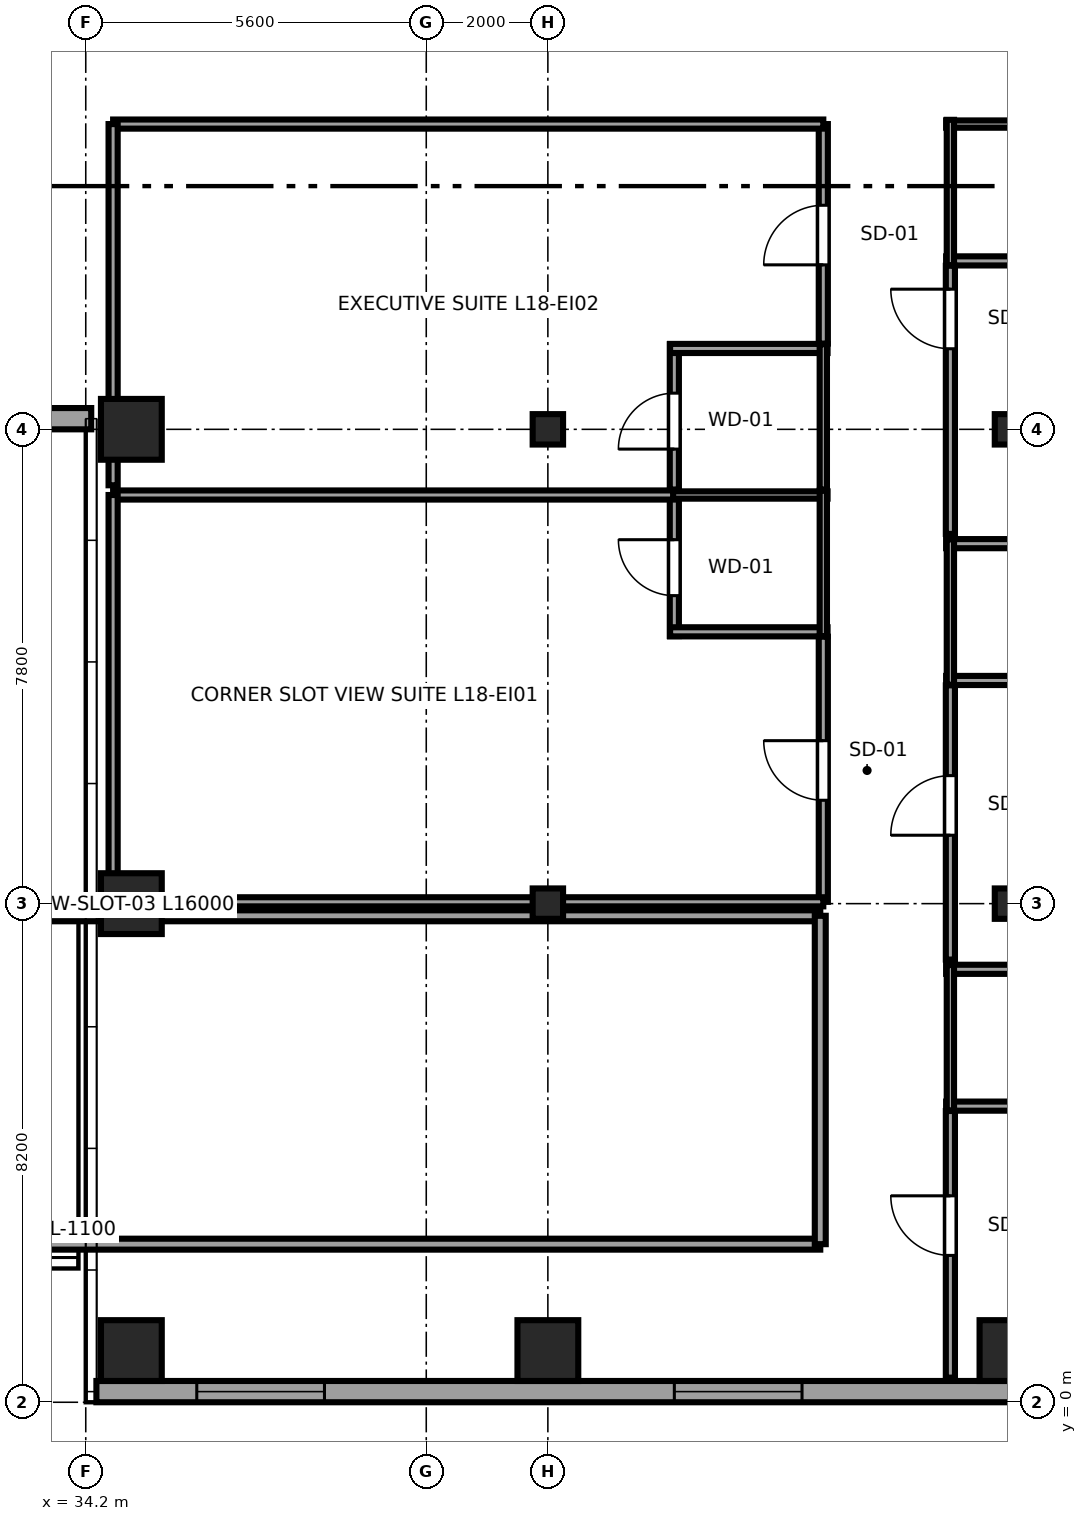
"""IFC4 building model, lengths in metres.
Left out: names, types, materials, properties, quantities, classifications, styles, units other than length and angle.
Written with IfcOpenShell. Run it as: python <this file> out.ifc"""

import sys

from ifc_helpers import new_model, si_unit, direction, frame, frame_2d, origin, origin_2d, place, context, subcontext, project, spatial, rectangle, i_section, extrude, source, transform, mapped, element, fill, save


model = new_model("IFC4")
c1 = context("Model", 3, precision=1e-05, world=origin(), true_north=direction((0.0, 1.0)))
c2 = subcontext(c1, "Body", "Model", "MODEL_VIEW")
j1 = project(units=[si_unit("LENGTHUNIT", "METRE"), si_unit("PLANEANGLEUNIT", "RADIAN")], contexts=[c1])
p1 = place(None, origin())
s1 = spatial("IfcSite", under=j1, at=p1, CompositionType="ELEMENT")
p2 = place(p1, origin())
s2 = spatial("IfcBuilding", under=s1, at=p2, CompositionType="ELEMENT")
p3 = place(p2, frame((0.0, 0.0, 74.6)))
s3 = spatial("IfcBuildingStorey", under=s2, at=p3, CompositionType="ELEMENT", Elevation=74.6)
m1 = source(origin(), c2, "Body", "SweptSolid", [
    extrude(rectangle(XDim=1.0, YDim=1.0, at=origin_2d()), origin(), (0.0, 0.0, 1.0), 3.55),
])
for number, where, z_axis, x_axis in (
    (1, (34.95, 0.85, 0.0), (0.0, 0.0, 1.0), (1.0, 0.0, 0.0)),
    (2, (34.95, 8.2, 0.0), (0.0, 0.0, 1.0), (1.0, 0.0, 0.0)),
    (3, (34.95, 16.0, 0.0), (0.0, 0.0, 1.0), (1.0, 0.0, 0.0)),
    (4, (41.8, 0.85, 0.0), (0.0, 0.0, 1.0), (1.0, 0.0, 0.0)),
):
    element("IfcColumn", number, at=place(p3, frame(where, z_axis=z_axis, x_axis=x_axis)), inside=s3, PredefinedType="COLUMN", context=c2, shape_type="MappedRepresentation", body=[
        mapped(m1, transform((0.0, 0.0, 0.0), x_axis=(1.0, 0.0, 0.0), y_axis=(0.0, 1.0, 0.0), z_axis=(0.0, 0.0, 1.0), scale=1.0)),
    ])
m2 = source(origin(), c2, "Body", "SweptSolid", [
    extrude(i_section(OverallWidth=0.5, OverallDepth=0.5, WebThickness=0.028, FlangeThickness=0.045, at=origin_2d()), origin(), (0.0, 0.0, 1.0), 3.55),
])
for number, where, z_axis, x_axis in (
    (5, (41.8, 8.2, 0.0), (0.0, 0.0, 1.0), (1.0, 0.0, 0.0)),
    (6, (41.8, 16.0, 0.0), (0.0, 0.0, 1.0), (1.0, 0.0, 0.0)),
):
    element("IfcColumn", number, at=place(p3, frame(where, z_axis=z_axis, x_axis=x_axis)), inside=s3, PredefinedType="COLUMN", context=c2, shape_type="MappedRepresentation", body=[
        mapped(m2, transform((0.0, 0.0, 0.0), x_axis=(1.0, 0.0, 0.0), y_axis=(0.0, 1.0, 0.0), z_axis=(0.0, 0.0, 1.0), scale=1.0)),
    ])
p4 = place(p3, frame((49.4, 0.85, 0.0), z_axis=(0.0, 0.0, 1.0), x_axis=(1.0, 0.0, 0.0)))
e7 = element("IfcColumn", 7, at=p4, inside=s3, PredefinedType="COLUMN", context=c2, shape_type="MappedRepresentation", body=[
    mapped(m1, transform((0.0, 0.0, 0.0), x_axis=(1.0, 0.0, 0.0), y_axis=(0.0, 1.0, 0.0), z_axis=(0.0, 0.0, 1.0), scale=1.0)),
])
for number, where, z_axis, x_axis in (
    (8, (49.4, 8.2, 0.0), (0.0, 0.0, 1.0), (1.0, 0.0, 0.0)),
    (9, (49.4, 16.0, 0.0), (0.0, 0.0, 1.0), (1.0, 0.0, 0.0)),
):
    element("IfcColumn", number, at=place(p3, frame(where, z_axis=z_axis, x_axis=x_axis)), inside=s3, PredefinedType="COLUMN", context=c2, shape_type="MappedRepresentation", body=[
        mapped(m2, transform((0.0, 0.0, 0.0), x_axis=(1.0, 0.0, 0.0), y_axis=(0.0, 1.0, 0.0), z_axis=(0.0, 0.0, 1.0), scale=1.0)),
    ])
p5 = place(p3, frame((22.71, 16.175, 0.0), z_axis=(0.0, 0.0, 1.0), x_axis=(1.0, 0.0, 0.0)))
e10 = element("IfcWall", 10, at=p5, inside=s3, PredefinedType="SOLIDWALL", context=c2, shape_type="SweptSolid", body=[
    extrude(rectangle(XDim=11.58, YDim=0.35, at=frame_2d((5.79, 0.0))), origin(), (0.0, 0.0, 1.0), 2.748),
])
p6 = place(p5, frame((2.145, 0.0, 0.68)))
e11 = element("IfcOpeningElement", 11, at=p6, cuts=e10, PredefinedType="OPENING", context=c2, shape_type="SweptSolid", body=[
    extrude(rectangle(XDim=2.1, YDim=1.9, at=frame_2d((1.05, 0.95))), frame((0.0, 0.185, 0.0), z_axis=(0.0, -1.0, 0.0), x_axis=(1.0, 0.0, 0.0)), (0.0, 0.0, 1.0), 0.37),
])
p7 = place(p5, frame((7.335, 0.0, 0.68)))
e12 = element("IfcOpeningElement", 12, at=p7, cuts=e10, PredefinedType="OPENING", context=c2, shape_type="SweptSolid", body=[
    extrude(rectangle(XDim=2.1, YDim=1.9, at=frame_2d((1.05, 0.95))), frame((0.0, 0.185, 0.0), z_axis=(0.0, -1.0, 0.0), x_axis=(1.0, 0.0, 0.0)), (0.0, 0.0, 1.0), 0.37),
])
p8 = place(p3, frame((34.375, 0.175, 0.0), z_axis=(0.0, 0.0, 1.0), x_axis=(1.0, 0.0, 0.0)))
e13 = element("IfcWall", 13, at=p8, inside=s3, PredefinedType="SOLIDWALL", context=c2, shape_type="SweptSolid", body=[
    extrude(rectangle(XDim=18.008, YDim=0.35, at=frame_2d((9.004, 0.0))), origin(), (0.0, 0.0, 1.0), 3.37),
])
p9 = place(p8, frame((1.651, 0.0, 0.68)))
e14 = element("IfcOpeningElement", 14, at=p9, cuts=e13, PredefinedType="OPENING", context=c2, shape_type="SweptSolid", body=[
    extrude(rectangle(XDim=2.1, YDim=1.9, at=frame_2d((1.05, 0.95))), frame((0.0, 0.185, 0.0), z_axis=(0.0, -1.0, 0.0), x_axis=(1.0, 0.0, 0.0)), (0.0, 0.0, 1.0), 0.37),
])
p10 = place(p8, frame((9.505, 0.0, 0.68)))
e15 = element("IfcOpeningElement", 15, at=p10, cuts=e13, PredefinedType="OPENING", context=c2, shape_type="SweptSolid", body=[
    extrude(rectangle(XDim=2.1, YDim=1.9, at=frame_2d((1.05, 0.95))), frame((0.0, 0.185, 0.0), z_axis=(0.0, -1.0, 0.0), x_axis=(1.0, 0.0, 0.0)), (0.0, 0.0, 1.0), 0.37),
])
p11 = place(p3, frame((43.88, 12.6, 0.0), z_axis=(0.0, 0.0, 1.0), x_axis=(0.0, 1.0, 0.0)))
e16 = element("IfcWall", 16, at=p11, inside=s3, PredefinedType="PARTITIONING", context=c2, shape_type="SweptSolid", body=[
    extrude(rectangle(XDim=2.39, YDim=0.15, at=frame_2d((1.195, 0.0))), origin(), (0.0, 0.0, 1.0), 3.37),
])
p12 = place(p11, frame((0.665, 0.0, 0.0)))
e17 = element("IfcOpeningElement", 17, at=p12, cuts=e16, PredefinedType="OPENING", context=c2, shape_type="SweptSolid", body=[
    extrude(rectangle(XDim=0.92, YDim=2.01, at=frame_2d((0.46, 1.005))), frame((0.0, 0.085, 0.0), z_axis=(0.0, -1.0, 0.0), x_axis=(1.0, 0.0, 0.0)), (0.0, 0.0, 1.0), 0.17),
])
p13 = place(p3, frame((43.81, 12.67, 0.0), z_axis=(0.0, 0.0, 1.0), x_axis=(1.0, 0.0, 0.0)))
e18 = element("IfcWall", 18, at=p13, inside=s3, PredefinedType="PARTITIONING", context=c2, shape_type="SweptSolid", body=[
    extrude(rectangle(XDim=2.59, YDim=0.15, at=frame_2d((1.295, 0.0))), origin(), (0.0, 0.0, 1.0), 3.37),
])
p14 = place(p3, frame((43.81, 14.92, 0.0), z_axis=(0.0, 0.0, 1.0), x_axis=(1.0, 0.0, 0.0)))
e19 = element("IfcWall", 19, at=p14, inside=s3, PredefinedType="PLUMBINGWALL", context=c2, shape_type="SweptSolid", body=[
    extrude(rectangle(XDim=2.59, YDim=0.12, at=frame_2d((1.295, 0.0))), origin(), (0.0, 0.0, 1.0), 3.37),
])
p15 = place(p3, frame((46.33, 12.6, 0.0), z_axis=(0.0, 0.0, 1.0), x_axis=(0.0, 1.0, 0.0)))
e20 = element("IfcWall", 20, at=p15, inside=s3, PredefinedType="PLUMBINGWALL", context=c2, shape_type="SweptSolid", body=[
    extrude(rectangle(XDim=2.39, YDim=0.12, at=frame_2d((1.195, 0.0))), origin(), (0.0, 0.0, 1.0), 3.37),
])
p16 = place(p3, frame((43.88, 15.01, 0.0), z_axis=(0.0, 0.0, 1.0), x_axis=(0.0, 1.0, 0.0)))
e21 = element("IfcWall", 21, at=p16, inside=s3, PredefinedType="PARTITIONING", context=c2, shape_type="SweptSolid", body=[
    extrude(rectangle(XDim=2.39, YDim=0.15, at=frame_2d((1.195, 0.0))), origin(), (0.0, 0.0, 1.0), 3.37),
])
p17 = place(p16, frame((0.665, 0.0, 0.0)))
e22 = element("IfcOpeningElement", 22, at=p17, cuts=e21, PredefinedType="OPENING", context=c2, shape_type="SweptSolid", body=[
    extrude(rectangle(XDim=0.92, YDim=2.01, at=frame_2d((0.46, 1.005))), frame((0.0, 0.085, 0.0), z_axis=(0.0, -1.0, 0.0), x_axis=(1.0, 0.0, 0.0)), (0.0, 0.0, 1.0), 0.17),
])
p18 = place(p3, frame((43.81, 17.33, 0.0), z_axis=(0.0, 0.0, 1.0), x_axis=(1.0, 0.0, 0.0)))
e23 = element("IfcWall", 23, at=p18, inside=s3, PredefinedType="PARTITIONING", context=c2, shape_type="SweptSolid", body=[
    extrude(rectangle(XDim=2.59, YDim=0.15, at=frame_2d((1.295, 0.0))), origin(), (0.0, 0.0, 1.0), 3.37),
])
p19 = place(p3, frame((46.33, 15.01, 0.0), z_axis=(0.0, 0.0, 1.0), x_axis=(0.0, 1.0, 0.0)))
e24 = element("IfcWall", 24, at=p19, inside=s3, PredefinedType="PLUMBINGWALL", context=c2, shape_type="SweptSolid", body=[
    extrude(rectangle(XDim=2.39, YDim=0.12, at=frame_2d((1.195, 0.0))), origin(), (0.0, 0.0, 1.0), 3.37),
])
for number, where, z_axis, x_axis in (
    (25, (48.35, 4.87, 0.0), (0.0, 0.0, 1.0), (1.0, 0.0, 0.0)),
    (26, (48.35, 7.12, 0.0), (0.0, 0.0, 1.0), (1.0, 0.0, 0.0)),
):
    element("IfcWall", number, at=place(p3, frame(where, z_axis=z_axis, x_axis=x_axis)), inside=s3, PredefinedType="PARTITIONING", context=c2, shape_type="SweptSolid", body=[
        extrude(rectangle(XDim=2.59, YDim=0.15, at=frame_2d((1.295, 0.0))), origin(), (0.0, 0.0, 1.0), 3.37),
    ])
p20 = place(p3, frame((48.42, 4.8, 0.0), z_axis=(0.0, 0.0, 1.0), x_axis=(0.0, 1.0, 0.0)))
e27 = element("IfcWall", 27, at=p20, inside=s3, PredefinedType="PLUMBINGWALL", context=c2, shape_type="SweptSolid", body=[
    extrude(rectangle(XDim=2.39, YDim=0.12, at=frame_2d((1.195, 0.0))), origin(), (0.0, 0.0, 1.0), 3.37),
])
for number, where, z_axis, x_axis in (
    (28, (48.35, 11.87, 0.0), (0.0, 0.0, 1.0), (1.0, 0.0, 0.0)),
    (29, (48.35, 14.12, 0.0), (0.0, 0.0, 1.0), (1.0, 0.0, 0.0)),
):
    element("IfcWall", number, at=place(p3, frame(where, z_axis=z_axis, x_axis=x_axis)), inside=s3, PredefinedType="PARTITIONING", context=c2, shape_type="SweptSolid", body=[
        extrude(rectangle(XDim=2.59, YDim=0.15, at=frame_2d((1.295, 0.0))), origin(), (0.0, 0.0, 1.0), 3.37),
    ])
p21 = place(p3, frame((48.42, 11.8, 0.0), z_axis=(0.0, 0.0, 1.0), x_axis=(0.0, 1.0, 0.0)))
e30 = element("IfcWall", 30, at=p21, inside=s3, PredefinedType="PLUMBINGWALL", context=c2, shape_type="SweptSolid", body=[
    extrude(rectangle(XDim=2.39, YDim=0.12, at=frame_2d((1.195, 0.0))), origin(), (0.0, 0.0, 1.0), 3.37),
])
p22 = place(p3, frame((48.35, 18.77, 0.0), z_axis=(0.0, 0.0, 1.0), x_axis=(1.0, 0.0, 0.0)))
e31 = element("IfcWall", 31, at=p22, inside=s3, PredefinedType="PARTITIONING", context=c2, shape_type="SweptSolid", body=[
    extrude(rectangle(XDim=2.59, YDim=0.15, at=frame_2d((1.295, 0.0))), origin(), (0.0, 0.0, 1.0), 3.37),
])
p23 = place(p3, frame((48.35, 21.02, 0.0), z_axis=(0.0, 0.0, 1.0), x_axis=(1.0, 0.0, 0.0)))
e32 = element("IfcWall", 32, at=p23, inside=s3, PredefinedType="PLUMBINGWALL", context=c2, shape_type="SweptSolid", body=[
    extrude(rectangle(XDim=2.59, YDim=0.12, at=frame_2d((1.295, 0.0))), origin(), (0.0, 0.0, 1.0), 3.37),
])
p24 = place(p3, frame((48.42, 18.7, 0.0), z_axis=(0.0, 0.0, 1.0), x_axis=(0.0, 1.0, 0.0)))
e33 = element("IfcWall", 33, at=p24, inside=s3, PredefinedType="PLUMBINGWALL", context=c2, shape_type="SweptSolid", body=[
    extrude(rectangle(XDim=2.39, YDim=0.12, at=frame_2d((1.195, 0.0))), origin(), (0.0, 0.0, 1.0), 3.37),
])
p25 = place(p3, frame((46.33, 8.23, 0.0), z_axis=(0.0, 0.0, 1.0), x_axis=(0.0, 1.0, 0.0)))
e34 = element("IfcWall", 34, at=p25, inside=s3, PredefinedType="PARTITIONING", context=c2, shape_type="SweptSolid", body=[
    extrude(rectangle(XDim=4.36, YDim=0.15, at=frame_2d((2.18, 0.0))), origin(), (0.0, 0.0, 1.0), 3.37),
])
p26 = place(p25, frame((1.67, 0.0, 0.0)))
e35 = element("IfcOpeningElement", 35, at=p26, cuts=e34, PredefinedType="OPENING", context=c2, shape_type="SweptSolid", body=[
    extrude(rectangle(XDim=0.98, YDim=2.12, at=frame_2d((0.49, 1.06))), frame((0.0, 0.085, 0.0), z_axis=(0.0, -1.0, 0.0), x_axis=(1.0, 0.0, 0.0)), (0.0, 0.0, 1.0), 0.17),
])
p27 = place(p3, frame((34.65, 8.23, 0.0), z_axis=(0.0, 0.0, 1.0), x_axis=(1.0, 0.0, 0.0)))
e36 = element("IfcWall", 36, at=p27, inside=s3, PredefinedType="PARTITIONING", context=c2, shape_type="SweptSolid", body=[
    extrude(rectangle(XDim=11.68, YDim=0.15, at=frame_2d((5.84, 0.0))), origin(), (0.0, 0.0, 1.0), 2.748),
])
p28 = place(p3, frame((34.65, 14.92, 0.0), z_axis=(0.0, 0.0, 1.0), x_axis=(1.0, 0.0, 0.0)))
e37 = element("IfcWall", 37, at=p28, inside=s3, PredefinedType="PARTITIONING", context=c2, shape_type="SweptSolid", body=[
    extrude(rectangle(XDim=9.21, YDim=0.15, at=frame_2d((4.605, 0.0))), origin(), (0.0, 0.0, 1.0), 3.37),
])
p29 = place(p3, frame((34.65, 8.23, 0.0), z_axis=(0.0, 0.0, 1.0), x_axis=(0.0, 1.0, 0.0)))
e38 = element("IfcWall", 38, at=p29, inside=s3, PredefinedType="PARTITIONING", context=c2, shape_type="SweptSolid", body=[
    extrude(rectangle(XDim=6.69, YDim=0.15, at=frame_2d((3.345, 0.0))), origin(), (0.0, 0.0, 1.0), 3.37),
])
p30 = place(p3, frame((46.33, 17.41, 0.0), z_axis=(0.0, 0.0, 1.0), x_axis=(0.0, 1.0, 0.0)))
e39 = element("IfcWall", 39, at=p30, inside=s3, PredefinedType="PARTITIONING", context=c2, shape_type="SweptSolid", body=[
    extrude(rectangle(XDim=3.61, YDim=0.15, at=frame_2d((1.805, 0.0))), origin(), (0.0, 0.0, 1.0), 3.37),
])
p31 = place(p30, frame((1.295, 0.0, 0.0)))
e40 = element("IfcOpeningElement", 40, at=p31, cuts=e39, PredefinedType="OPENING", context=c2, shape_type="SweptSolid", body=[
    extrude(rectangle(XDim=0.98, YDim=2.12, at=frame_2d((0.49, 1.06))), frame((0.0, 0.085, 0.0), z_axis=(0.0, -1.0, 0.0), x_axis=(1.0, 0.0, 0.0)), (0.0, 0.0, 1.0), 0.17),
])
p32 = place(p3, frame((34.65, 21.02, 0.0), z_axis=(0.0, 0.0, 1.0), x_axis=(1.0, 0.0, 0.0)))
e41 = element("IfcWall", 41, at=p32, inside=s3, PredefinedType="PARTITIONING", context=c2, shape_type="SweptSolid", body=[
    extrude(rectangle(XDim=11.68, YDim=0.15, at=frame_2d((5.84, 0.0))), origin(), (0.0, 0.0, 1.0), 3.37),
])
p33 = place(p3, frame((34.65, 15.08, 0.0), z_axis=(0.0, 0.0, 1.0), x_axis=(0.0, 1.0, 0.0)))
e42 = element("IfcWall", 42, at=p33, inside=s3, PredefinedType="PARTITIONING", context=c2, shape_type="SweptSolid", body=[
    extrude(rectangle(XDim=5.94, YDim=0.15, at=frame_2d((2.97, 0.0))), origin(), (0.0, 0.0, 1.0), 3.37),
])
p34 = place(p3, frame((48.42, 0.405, 0.0), z_axis=(0.0, 0.0, 1.0), x_axis=(0.0, 1.0, 0.0)))
e43 = element("IfcWall", 43, at=p34, inside=s3, PredefinedType="PARTITIONING", context=c2, shape_type="SweptSolid", body=[
    extrude(rectangle(XDim=4.385, YDim=0.15, at=frame_2d((2.192, 0.0))), origin(), (0.0, 0.0, 1.0), 3.37),
])
p35 = place(p34, frame((2.01, 0.0, 0.0)))
e44 = element("IfcOpeningElement", 44, at=p35, cuts=e43, PredefinedType="OPENING", context=c2, shape_type="SweptSolid", body=[
    extrude(rectangle(XDim=0.98, YDim=2.12, at=frame_2d((0.49, 1.06))), frame((0.0, 0.085, 0.0), z_axis=(0.0, -1.0, 0.0), x_axis=(1.0, 0.0, 0.0)), (0.0, 0.0, 1.0), 0.17),
])
p36 = place(p3, frame((48.42, 7.28, 0.0), z_axis=(0.0, 0.0, 1.0), x_axis=(0.0, 1.0, 0.0)))
e45 = element("IfcWall", 45, at=p36, inside=s3, PredefinedType="PARTITIONING", context=c2, shape_type="SweptSolid", body=[
    extrude(rectangle(XDim=4.51, YDim=0.15, at=frame_2d((2.255, 0.0))), origin(), (0.0, 0.0, 1.0), 3.37),
])
p37 = place(p36, frame((2.045, 0.0, 0.0)))
e46 = element("IfcOpeningElement", 46, at=p37, cuts=e45, PredefinedType="OPENING", context=c2, shape_type="SweptSolid", body=[
    extrude(rectangle(XDim=0.98, YDim=2.12, at=frame_2d((0.49, 1.06))), frame((0.0, 0.085, 0.0), z_axis=(0.0, -1.0, 0.0), x_axis=(1.0, 0.0, 0.0)), (0.0, 0.0, 1.0), 0.17),
])
p38 = place(p3, frame((48.42, 14.28, 0.0), z_axis=(0.0, 0.0, 1.0), x_axis=(0.0, 1.0, 0.0)))
e47 = element("IfcWall", 47, at=p38, inside=s3, PredefinedType="PARTITIONING", context=c2, shape_type="SweptSolid", body=[
    extrude(rectangle(XDim=4.41, YDim=0.15, at=frame_2d((2.205, 0.0))), origin(), (0.0, 0.0, 1.0), 3.37),
])
p39 = place(p38, frame((3.045, 0.0, 0.0)))
e48 = element("IfcOpeningElement", 48, at=p39, cuts=e47, PredefinedType="OPENING", context=c2, shape_type="SweptSolid", body=[
    extrude(rectangle(XDim=0.98, YDim=2.12, at=frame_2d((0.49, 1.06))), frame((0.0, 0.085, 0.0), z_axis=(0.0, -1.0, 0.0), x_axis=(1.0, 0.0, 0.0)), (0.0, 0.0, 1.0), 0.17),
])
for number, where, z_axis, x_axis in (
    (49, (12.27, 2.6, 0.0), (0.0, 0.0, 1.0), (1.0, 0.0, 0.0)),
    (50, (12.27, 8.0, 0.0), (0.0, 0.0, 1.0), (1.0, 0.0, 0.0)),
):
    element("IfcWall", number, at=place(p3, frame(where, z_axis=z_axis, x_axis=x_axis)), inside=s3, PredefinedType="PARTITIONING", context=c2, shape_type="SweptSolid", body=[
        extrude(rectangle(XDim=34.01, YDim=0.18, at=frame_2d((17.005, 0.0))), origin(), (0.0, 0.0, 1.0), 3.37),
    ])
p40 = place(p3, frame((46.28, 2.6, 0.0), z_axis=(0.0, 0.0, 1.0), x_axis=(0.0, 1.0, 0.0)))
e51 = element("IfcWall", 51, at=p40, inside=s3, PredefinedType="PARTITIONING", context=c2, shape_type="SweptSolid", body=[
    extrude(rectangle(XDim=5.4, YDim=0.18, at=frame_2d((2.7, 0.0))), origin(), (0.0, 0.0, 1.0), 3.37),
])
m3 = source(origin(), c2, "Body", "SweptSolid", [
    extrude(rectangle(XDim=2.1, YDim=1.9, at=frame_2d((1.05, 0.95))), frame((0.0, 0.09, 0.0), z_axis=(0.0, -1.0, 0.0), x_axis=(1.0, 0.0, 0.0)), (0.0, 0.0, 1.0), 0.06),
])
p41 = place(p9, origin())
e52 = element("IfcWindow", 52, at=p41, inside=s3, PartitioningType="TRIPLE_PANEL_HORIZONTAL", PredefinedType="WINDOW", context=c2, shape_type="MappedRepresentation", body=[
    mapped(m3, transform((0.0, 0.0, 0.0), x_axis=(1.0, 0.0, 0.0), y_axis=(0.0, 1.0, 0.0), z_axis=(0.0, 0.0, 1.0), scale=1.0)),
])
fill(e14, e52)
p42 = place(p10, origin())
e53 = element("IfcWindow", 53, at=p42, inside=s3, PartitioningType="TRIPLE_PANEL_HORIZONTAL", PredefinedType="WINDOW", context=c2, shape_type="MappedRepresentation", body=[
    mapped(m3, transform((0.0, 0.0, 0.0), x_axis=(1.0, 0.0, 0.0), y_axis=(0.0, 1.0, 0.0), z_axis=(0.0, 0.0, 1.0), scale=1.0)),
])
fill(e15, e53)
m4 = source(origin(), c2, "Body", "SweptSolid", [
    extrude(rectangle(XDim=0.92, YDim=2.01, at=frame_2d((0.46, 1.005))), frame((0.0, 0.025, 0.0), z_axis=(0.0, -1.0, 0.0), x_axis=(1.0, 0.0, 0.0)), (0.0, 0.0, 1.0), 0.05),
])
p43 = place(p12, origin())
e54 = element("IfcDoor", 54, at=p43, inside=s3, OperationType="SINGLE_SWING_RIGHT", PredefinedType="DOOR", context=c2, shape_type="MappedRepresentation", body=[
    mapped(m4, transform((0.0, 0.0, 0.0), x_axis=(1.0, 0.0, 0.0), y_axis=(0.0, 1.0, 0.0), z_axis=(0.0, 0.0, 1.0), scale=1.0)),
])
fill(e17, e54)
p44 = place(p17, origin())
e55 = element("IfcDoor", 55, at=p44, inside=s3, OperationType="SINGLE_SWING_LEFT", PredefinedType="DOOR", context=c2, shape_type="MappedRepresentation", body=[
    mapped(m4, transform((0.0, 0.0, 0.0), x_axis=(1.0, 0.0, 0.0), y_axis=(0.0, 1.0, 0.0), z_axis=(0.0, 0.0, 1.0), scale=1.0)),
])
fill(e22, e55)
m5 = source(origin(), c2, "Body", "SweptSolid", [
    extrude(rectangle(XDim=0.98, YDim=2.12, at=frame_2d((0.49, 1.06))), frame((0.0, 0.025, 0.0), z_axis=(0.0, -1.0, 0.0), x_axis=(1.0, 0.0, 0.0)), (0.0, 0.0, 1.0), 0.05),
])
p45 = place(p26, origin())
e56 = element("IfcDoor", 56, at=p45, inside=s3, OperationType="SINGLE_SWING_RIGHT", PredefinedType="DOOR", context=c2, shape_type="MappedRepresentation", body=[
    mapped(m5, transform((0.0, 0.0, 0.0), x_axis=(1.0, 0.0, 0.0), y_axis=(0.0, 1.0, 0.0), z_axis=(0.0, 0.0, 1.0), scale=1.0)),
])
fill(e35, e56)
p46 = place(p31, origin())
e57 = element("IfcDoor", 57, at=p46, inside=s3, OperationType="SINGLE_SWING_LEFT", PredefinedType="DOOR", context=c2, shape_type="MappedRepresentation", body=[
    mapped(m5, transform((0.0, 0.0, 0.0), x_axis=(1.0, 0.0, 0.0), y_axis=(0.0, 1.0, 0.0), z_axis=(0.0, 0.0, 1.0), scale=1.0)),
])
fill(e40, e57)
p47 = place(p35, origin())
e58 = element("IfcDoor", 58, at=p47, inside=s3, OperationType="SINGLE_SWING_RIGHT", PredefinedType="DOOR", context=c2, shape_type="MappedRepresentation", body=[
    mapped(m5, transform((0.0, 0.0, 0.0), x_axis=(1.0, 0.0, 0.0), y_axis=(0.0, 1.0, 0.0), z_axis=(0.0, 0.0, 1.0), scale=1.0)),
])
fill(e44, e58)
p48 = place(p37, origin())
e59 = element("IfcDoor", 59, at=p48, inside=s3, OperationType="SINGLE_SWING_LEFT", PredefinedType="DOOR", context=c2, shape_type="MappedRepresentation", body=[
    mapped(m5, transform((0.0, 0.0, 0.0), x_axis=(1.0, 0.0, 0.0), y_axis=(0.0, 1.0, 0.0), z_axis=(0.0, 0.0, 1.0), scale=1.0)),
])
fill(e46, e59)
p49 = place(p39, origin())
e60 = element("IfcDoor", 60, at=p49, inside=s3, OperationType="SINGLE_SWING_RIGHT", PredefinedType="DOOR", context=c2, shape_type="MappedRepresentation", body=[
    mapped(m5, transform((0.0, 0.0, 0.0), x_axis=(1.0, 0.0, 0.0), y_axis=(0.0, 1.0, 0.0), z_axis=(0.0, 0.0, 1.0), scale=1.0)),
])
fill(e48, e60)
save(model, sys.argv[1])
